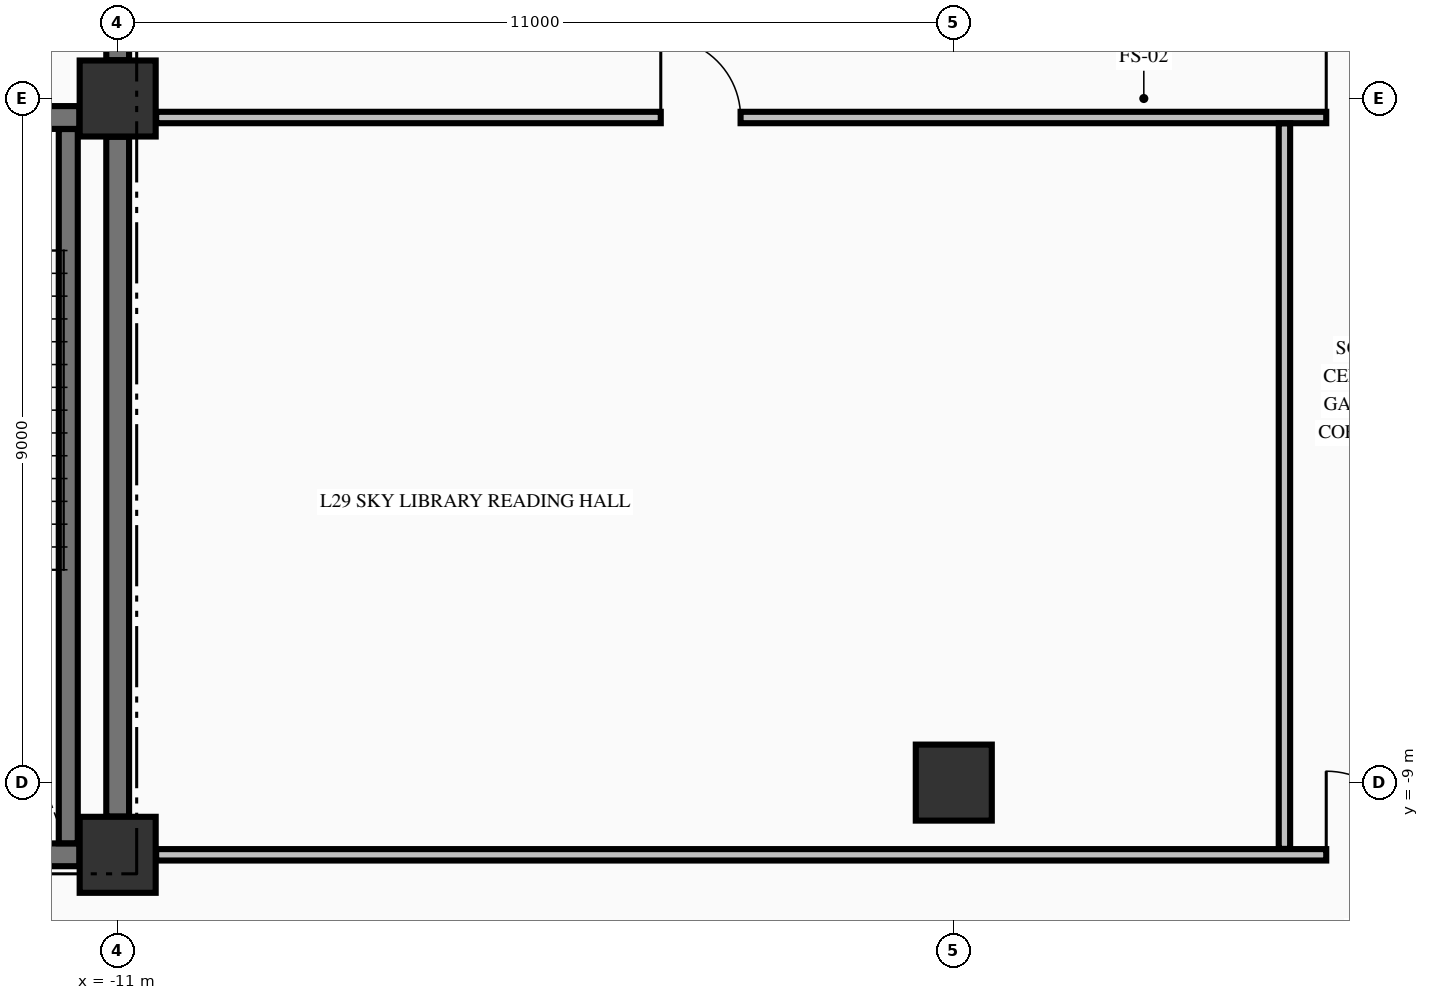
"""IFC4 building model, lengths in metres.
Left out: names, types, materials, properties, quantities, classifications, styles, units other than length and angle.
Written with IfcOpenShell. Run it as: python <this file> out.ifc"""

import sys

from ifc_helpers import new_model, si_unit, direction, frame, frame_2d, origin, origin_2d, place, context, subcontext, project, spatial, rectangle, extrude, element, fill, save


model = new_model("IFC4")
c1 = context("Model", 3, precision=1e-05, world=origin(), true_north=direction((0.0, 1.0)))
c2 = subcontext(c1, "Body", "Model", "MODEL_VIEW")
j1 = project(units=[si_unit("LENGTHUNIT", "METRE"), si_unit("PLANEANGLEUNIT", "RADIAN")], contexts=[c1])
p1 = place(None, origin())
s1 = spatial("IfcSite", under=j1, at=p1, CompositionType="ELEMENT")
p2 = place(p1, origin())
s2 = spatial("IfcBuilding", under=s1, at=p2, CompositionType="ELEMENT")
p3 = place(p2, frame((0.0, 0.0, 116.35)))
s3 = spatial("IfcBuildingStorey", under=s2, at=p3, CompositionType="ELEMENT", Elevation=116.35)
for number, where, z_axis, x_axis in (
    (1, (-11.0, -9.95, -0.425), (0.0, 0.0, 1.0), (1.0, 0.0, 0.0)),
    (2, (-11.0, 0.0, -0.425), (0.0, 0.0, 1.0), (1.0, 0.0, 0.0)),
    (3, (0.0, -9.0, -0.425), (0.0, 0.0, 1.0), (1.0, 0.0, 0.0)),
):
    element("IfcColumn", number, at=place(p3, frame(where, z_axis=z_axis, x_axis=x_axis)), inside=s3, PredefinedType="COLUMN", context=c2, shape_type="SweptSolid", body=[
        extrude(rectangle(XDim=1.0, YDim=1.0, at=origin_2d()), origin(), (0.0, 0.0, 1.0), 5.0),
    ])
p4 = place(p3, frame((-14.7, -9.95, 0.0), z_axis=(0.0, 0.0, 1.0), x_axis=(1.0, 0.0, 0.0)))
e4 = element("IfcWall", 4, at=p4, inside=s3, PredefinedType="SHEAR", context=c2, shape_type="SweptSolid", body=[
    extrude(rectangle(XDim=3.196, YDim=0.3, at=frame_2d((1.598, 0.0))), origin(), (0.0, 0.0, 1.0), 4.575),
])
p5 = place(p3, frame((-19.496, -0.25, 0.0), z_axis=(0.0, 0.0, 1.0), x_axis=(1.0, 0.0, 0.0)))
e5 = element("IfcWall", 5, at=p5, inside=s3, PredefinedType="SHEAR", context=c2, shape_type="SweptSolid", body=[
    extrude(rectangle(XDim=7.992, YDim=0.3, at=frame_2d((3.996, 0.0))), origin(), (0.0, 0.0, 1.0), 4.575),
])
p6 = place(p5, frame((5.796, 0.0, 0.0)))
e6 = element("IfcOpeningElement", 6, at=p6, cuts=e5, PredefinedType="OPENING", context=c2, shape_type="SweptSolid", body=[
    extrude(rectangle(XDim=1.1, YDim=2.15, at=frame_2d((0.55, 1.075))), frame((0.0, 0.16, 0.0), z_axis=(0.0, -1.0, 0.0), x_axis=(1.0, 0.0, 0.0)), (0.0, 0.0, 1.0), 0.32),
])
p7 = place(p3, frame((-10.494, -9.95, 0.0), z_axis=(0.0, 0.0, 1.0), x_axis=(1.0, 0.0, 0.0)))
e7 = element("IfcWall", 7, at=p7, inside=s3, PredefinedType="PARTITIONING", context=c2, shape_type="SweptSolid", body=[
    extrude(rectangle(XDim=20.988, YDim=0.15, at=frame_2d((10.494, 0.0))), origin(), (0.0, 0.0, 1.0), 4.575),
])
p8 = place(p7, frame((15.394, 0.0, 0.0)))
e8 = element("IfcOpeningElement", 8, at=p8, cuts=e7, PredefinedType="OPENING", context=c2, shape_type="SweptSolid", body=[
    extrude(rectangle(XDim=1.1, YDim=2.15, at=frame_2d((0.55, 1.075))), frame((0.0, 0.085, 0.0), z_axis=(0.0, -1.0, 0.0), x_axis=(1.0, 0.0, 0.0)), (0.0, 0.0, 1.0), 0.17),
])
p9 = place(p7, frame((19.888, 0.0, 0.0)))
e9 = element("IfcOpeningElement", 9, at=p9, cuts=e7, PredefinedType="OPENING", context=c2, shape_type="SweptSolid", body=[
    extrude(rectangle(XDim=0.95, YDim=2.02, at=frame_2d((0.475, 1.01))), frame((0.0, 0.085, 0.0), z_axis=(0.0, -1.0, 0.0), x_axis=(1.0, 0.0, 0.0)), (0.0, 0.0, 1.0), 0.17),
])
p10 = place(p3, frame((-10.494, -0.25, 0.0), z_axis=(0.0, 0.0, 1.0), x_axis=(1.0, 0.0, 0.0)))
e10 = element("IfcWall", 10, at=p10, inside=s3, PredefinedType="PARTITIONING", context=c2, shape_type="SweptSolid", body=[
    extrude(rectangle(XDim=20.988, YDim=0.15, at=frame_2d((10.494, 0.0))), origin(), (0.0, 0.0, 1.0), 4.575),
])
p11 = place(p10, frame((15.394, 0.0, 0.0)))
e11 = element("IfcOpeningElement", 11, at=p11, cuts=e10, PredefinedType="OPENING", context=c2, shape_type="SweptSolid", body=[
    extrude(rectangle(XDim=1.1, YDim=2.15, at=frame_2d((0.55, 1.075))), frame((0.0, 0.085, 0.0), z_axis=(0.0, -1.0, 0.0), x_axis=(1.0, 0.0, 0.0)), (0.0, 0.0, 1.0), 0.17),
])
p12 = place(p10, frame((6.639, 0.0, 0.0)))
e12 = element("IfcOpeningElement", 12, at=p12, cuts=e10, PredefinedType="OPENING", context=c2, shape_type="SweptSolid", body=[
    extrude(rectangle(XDim=1.05, YDim=2.15, at=frame_2d((0.525, 1.075))), frame((0.0, 0.085, 0.0), z_axis=(0.0, -1.0, 0.0), x_axis=(1.0, 0.0, 0.0)), (0.0, 0.0, 1.0), 0.17),
])
p13 = place(p10, frame((18.799, 0.0, 0.0)))
e13 = element("IfcOpeningElement", 13, at=p13, cuts=e10, PredefinedType="OPENING", context=c2, shape_type="SweptSolid", body=[
    extrude(rectangle(XDim=0.95, YDim=2.15, at=frame_2d((0.475, 1.075))), frame((0.0, 0.085, 0.0), z_axis=(0.0, -1.0, 0.0), x_axis=(1.0, 0.0, 0.0)), (0.0, 0.0, 1.0), 0.17),
])
p14 = place(p3, frame((-11.65, -9.798, 0.0), z_axis=(0.0, 0.0, 1.0), x_axis=(0.0, 1.0, 0.0)))
e14 = element("IfcWall", 14, at=p14, inside=s3, PredefinedType="SOLIDWALL", context=c2, shape_type="SweptSolid", body=[
    extrude(rectangle(XDim=9.396, YDim=0.25, at=frame_2d((4.698, 0.0))), origin(), (0.0, 0.0, 1.0), 4.575),
])
p15 = place(p3, frame((-11.0, -9.446, 0.0), z_axis=(0.0, 0.0, 1.0), x_axis=(0.0, 1.0, 0.0)))
e15 = element("IfcWall", 15, at=p15, inside=s3, PredefinedType="SHEAR", context=c2, shape_type="SweptSolid", body=[
    extrude(rectangle(XDim=8.942, YDim=0.3, at=frame_2d((4.471, 0.0))), origin(), (0.0, 0.0, 1.0), 4.575),
])
p16 = place(p3, frame((-11.0, 0.504, 0.0), z_axis=(0.0, 0.0, 1.0), x_axis=(0.0, 1.0, 0.0)))
e16 = element("IfcWall", 16, at=p16, inside=s3, PredefinedType="SHEAR", context=c2, shape_type="SweptSolid", body=[
    extrude(rectangle(XDim=2.244, YDim=0.3, at=frame_2d((1.122, 0.0))), origin(), (0.0, 0.0, 1.0), 4.575),
])
p17 = place(p16, frame((0.596, 0.0, 0.0)))
e17 = element("IfcOpeningElement", 17, at=p17, cuts=e16, PredefinedType="OPENING", context=c2, shape_type="SweptSolid", body=[
    extrude(rectangle(XDim=1.1, YDim=2.15, at=frame_2d((0.55, 1.075))), frame((0.0, 0.16, 0.0), z_axis=(0.0, -1.0, 0.0), x_axis=(1.0, 0.0, 0.0)), (0.0, 0.0, 1.0), 0.32),
])
p18 = place(p3, frame((4.35, -9.872, 0.0), z_axis=(0.0, 0.0, 1.0), x_axis=(0.0, 1.0, 0.0)))
e18 = element("IfcWall", 18, at=p18, inside=s3, PredefinedType="PARTITIONING", context=c2, shape_type="SweptSolid", body=[
    extrude(rectangle(XDim=9.544, YDim=0.15, at=frame_2d((4.772, 0.0))), origin(), (0.0, 0.0, 1.0), 4.575),
])
p19 = place(p8, origin())
e19 = element("IfcDoor", 19, at=p19, inside=s3, OperationType="SINGLE_SWING_LEFT", PredefinedType="DOOR", context=c2, shape_type="SweptSolid", body=[
    extrude(rectangle(XDim=1.1, YDim=2.15, at=frame_2d((0.55, 1.075))), frame((0.0, 0.025, 0.0), z_axis=(0.0, -1.0, 0.0), x_axis=(1.0, 0.0, 0.0)), (0.0, 0.0, 1.0), 0.05),
])
fill(e8, e19)
p20 = place(p11, origin())
e20 = element("IfcDoor", 20, at=p20, inside=s3, OperationType="SINGLE_SWING_LEFT", PredefinedType="DOOR", context=c2, shape_type="SweptSolid", body=[
    extrude(rectangle(XDim=1.1, YDim=2.15, at=frame_2d((0.55, 1.075))), frame((0.0, 0.025, 0.0), z_axis=(0.0, -1.0, 0.0), x_axis=(1.0, 0.0, 0.0)), (0.0, 0.0, 1.0), 0.05),
])
fill(e11, e20)
p21 = place(p12, origin())
e21 = element("IfcDoor", 21, at=p21, inside=s3, OperationType="SINGLE_SWING_LEFT", PredefinedType="DOOR", context=c2, shape_type="SweptSolid", body=[
    extrude(rectangle(XDim=1.05, YDim=2.15, at=frame_2d((0.525, 1.075))), frame((0.0, 0.025, 0.0), z_axis=(0.0, -1.0, 0.0), x_axis=(1.0, 0.0, 0.0)), (0.0, 0.0, 1.0), 0.05),
])
fill(e12, e21)
save(model, sys.argv[1])
